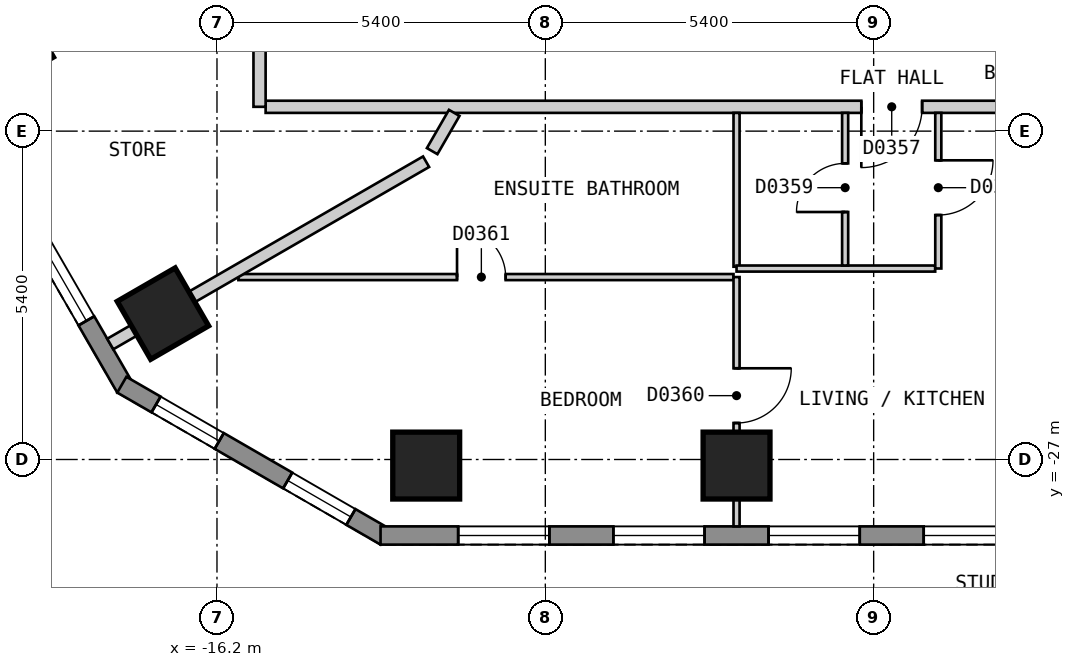
"""IFC4 building model, lengths in metres.
Left out: names, types, materials, properties, quantities, classifications, styles, units other than length and angle.
Written with IfcOpenShell. Run it as: python <this file> out.ifc"""

import sys

from ifc_helpers import new_model, si_unit, direction, frame, frame_2d, origin, origin_2d, place, context, subcontext, project, spatial, polyline, rectangle, outline, extrude, element, fill, save


model = new_model("IFC4")
c1 = context("Model", 3, precision=1e-05, world=origin(), true_north=direction((0.0, 1.0)))
c2 = subcontext(c1, "Body", "Model", "MODEL_VIEW")
j1 = project(units=[si_unit("LENGTHUNIT", "METRE"), si_unit("PLANEANGLEUNIT", "RADIAN")], contexts=[c1])
p1 = place(None, origin())
s1 = spatial("IfcSite", under=j1, at=p1, CompositionType="ELEMENT")
p2 = place(p1, origin())
s2 = spatial("IfcBuilding", under=s1, at=p2, CompositionType="ELEMENT")
p3 = place(p2, frame((0.0, 0.0, 59.4)))
s3 = spatial("IfcBuildingStorey", under=s2, at=p3, CompositionType="ELEMENT", Elevation=59.4)
for number, where, z_axis, x_axis in (
    (1, (-19.641, -20.181, 0.0), (0.0, 0.0, 1.0), (0.5, -0.866, 0.0)),
    (2, (-17.089, -24.601, 0.0), (0.0, 0.0, 1.0), (0.5, -0.866, 0.0)),
    (3, (-12.759, -27.1, 0.0), (0.0, 0.0, 1.0), (1.0, 0.0, 0.0)),
    (4, (-7.655, -27.1, 0.0), (0.0, 0.0, 1.0), (1.0, 0.0, 0.0)),
):
    element("IfcColumn", number, at=place(p3, frame(where, z_axis=z_axis, x_axis=x_axis)), inside=s3, PredefinedType="COLUMN", context=c2, shape_type="SweptSolid", body=[
        extrude(rectangle(XDim=1.1, YDim=1.1, at=origin_2d()), origin(), (0.0, 0.0, 1.0), 3.0),
    ])
p4 = place(p3, frame((-31.22, -2.425, 0.0), z_axis=(0.0, 0.0, 1.0), x_axis=(0.500001938803, -0.866024284413, 0.0)))
e5 = element("IfcWall", 5, at=p4, inside=s3, PredefinedType="SOLIDWALL", context=c2, shape_type="SweptSolid", body=[
    extrude(outline(polyline([(0.0, -0.15), (27.02, -0.15), (26.94, 0.15), (0.08, 0.15), (0.0, -0.15)])), origin(), (0.0, 0.0, 1.0), 2.6),
])
p5 = place(p4, frame((1.277, 0.0, 0.15)))
e6 = element("IfcOpeningElement", 6, at=p5, cuts=e5, PredefinedType="OPENING", context=c2, shape_type="SweptSolid", body=[
    extrude(rectangle(XDim=1.5, YDim=2.1, at=frame_2d((0.75, 1.05))), frame((0.0, 0.16, 0.0), z_axis=(0.0, -1.0, 0.0), x_axis=(1.0, 0.0, 0.0)), (0.0, 0.0, 1.0), 0.32),
])
p6 = place(p4, frame((3.829, 0.0, 0.15)))
e7 = element("IfcOpeningElement", 7, at=p6, cuts=e5, PredefinedType="OPENING", context=c2, shape_type="SweptSolid", body=[
    extrude(rectangle(XDim=1.5, YDim=2.1, at=frame_2d((0.75, 1.05))), frame((0.0, 0.16, 0.0), z_axis=(0.0, -1.0, 0.0), x_axis=(1.0, 0.0, 0.0)), (0.0, 0.0, 1.0), 0.32),
])
p7 = place(p4, frame((6.382, 0.0, 0.15)))
e8 = element("IfcOpeningElement", 8, at=p7, cuts=e5, PredefinedType="OPENING", context=c2, shape_type="SweptSolid", body=[
    extrude(rectangle(XDim=1.5, YDim=2.1, at=frame_2d((0.75, 1.05))), frame((0.0, 0.16, 0.0), z_axis=(0.0, -1.0, 0.0), x_axis=(1.0, 0.0, 0.0)), (0.0, 0.0, 1.0), 0.32),
])
p8 = place(p4, frame((8.933, 0.0, 0.15)))
e9 = element("IfcOpeningElement", 9, at=p8, cuts=e5, PredefinedType="OPENING", context=c2, shape_type="SweptSolid", body=[
    extrude(rectangle(XDim=1.5, YDim=2.1, at=frame_2d((0.75, 1.05))), frame((0.0, 0.16, 0.0), z_axis=(0.0, -1.0, 0.0), x_axis=(1.0, 0.0, 0.0)), (0.0, 0.0, 1.0), 0.32),
])
p9 = place(p4, frame((11.485, 0.0, 0.15)))
e10 = element("IfcOpeningElement", 10, at=p9, cuts=e5, PredefinedType="OPENING", context=c2, shape_type="SweptSolid", body=[
    extrude(rectangle(XDim=1.5, YDim=2.1, at=frame_2d((0.75, 1.05))), frame((0.0, 0.16, 0.0), z_axis=(0.0, -1.0, 0.0), x_axis=(1.0, 0.0, 0.0)), (0.0, 0.0, 1.0), 0.32),
])
p10 = place(p4, frame((14.037, 0.0, 0.15)))
e11 = element("IfcOpeningElement", 11, at=p10, cuts=e5, PredefinedType="OPENING", context=c2, shape_type="SweptSolid", body=[
    extrude(rectangle(XDim=1.5, YDim=2.1, at=frame_2d((0.75, 1.05))), frame((0.0, 0.16, 0.0), z_axis=(0.0, -1.0, 0.0), x_axis=(1.0, 0.0, 0.0)), (0.0, 0.0, 1.0), 0.32),
])
p11 = place(p4, frame((16.589, 0.0, 0.15)))
e12 = element("IfcOpeningElement", 12, at=p11, cuts=e5, PredefinedType="OPENING", context=c2, shape_type="SweptSolid", body=[
    extrude(rectangle(XDim=1.5, YDim=2.1, at=frame_2d((0.75, 1.05))), frame((0.0, 0.16, 0.0), z_axis=(0.0, -1.0, 0.0), x_axis=(1.0, 0.0, 0.0)), (0.0, 0.0, 1.0), 0.32),
])
p12 = place(p4, frame((19.141, 0.0, 0.15)))
e13 = element("IfcOpeningElement", 13, at=p12, cuts=e5, PredefinedType="OPENING", context=c2, shape_type="SweptSolid", body=[
    extrude(rectangle(XDim=1.5, YDim=2.1, at=frame_2d((0.75, 1.05))), frame((0.0, 0.16, 0.0), z_axis=(0.0, -1.0, 0.0), x_axis=(1.0, 0.0, 0.0)), (0.0, 0.0, 1.0), 0.32),
])
p13 = place(p4, frame((21.693, 0.0, 0.15)))
e14 = element("IfcOpeningElement", 14, at=p13, cuts=e5, PredefinedType="OPENING", context=c2, shape_type="SweptSolid", body=[
    extrude(rectangle(XDim=1.5, YDim=2.1, at=frame_2d((0.75, 1.05))), frame((0.0, 0.16, 0.0), z_axis=(0.0, -1.0, 0.0), x_axis=(1.0, 0.0, 0.0)), (0.0, 0.0, 1.0), 0.32),
])
p14 = place(p4, frame((24.244, 0.0, 0.15)))
e15 = element("IfcOpeningElement", 15, at=p14, cuts=e5, PredefinedType="OPENING", context=c2, shape_type="SweptSolid", body=[
    extrude(rectangle(XDim=1.5, YDim=2.1, at=frame_2d((0.75, 1.05))), frame((0.0, 0.16, 0.0), z_axis=(0.0, -1.0, 0.0), x_axis=(1.0, 0.0, 0.0)), (0.0, 0.0, 1.0), 0.32),
])
p15 = place(p3, frame((-17.765, -25.77, 0.0), z_axis=(0.0, 0.0, 1.0), x_axis=(0.866010750942, -0.50002537861, 0.0)))
e16 = element("IfcWall", 16, at=p15, inside=s3, PredefinedType="SOLIDWALL", context=c2, shape_type="SweptSolid", body=[
    extrude(outline(polyline([(0.0, -0.15), (5.0, -0.15), (4.919, 0.15), (0.08, 0.15), (0.0, -0.15)])), origin(), (0.0, 0.0, 1.0), 2.6),
])
p16 = place(p15, frame((0.65, 0.0, 0.15)))
e17 = element("IfcOpeningElement", 17, at=p16, cuts=e16, PredefinedType="OPENING", context=c2, shape_type="SweptSolid", body=[
    extrude(rectangle(XDim=1.2, YDim=2.1, at=frame_2d((0.6, 1.05))), frame((0.0, 0.16, 0.0), z_axis=(0.0, -1.0, 0.0), x_axis=(1.0, 0.0, 0.0)), (0.0, 0.0, 1.0), 0.32),
])
p17 = place(p15, frame((3.15, 0.0, 0.15)))
e18 = element("IfcOpeningElement", 18, at=p17, cuts=e16, PredefinedType="OPENING", context=c2, shape_type="SweptSolid", body=[
    extrude(rectangle(XDim=1.2, YDim=2.1, at=frame_2d((0.6, 1.05))), frame((0.0, 0.16, 0.0), z_axis=(0.0, -1.0, 0.0), x_axis=(1.0, 0.0, 0.0)), (0.0, 0.0, 1.0), 0.32),
])
p18 = place(p3, frame((-13.51, -28.25, 0.0), z_axis=(0.0, 0.0, 1.0), x_axis=(1.0, 0.0, 0.0)))
e19 = element("IfcWall", 19, at=p18, inside=s3, PredefinedType="SOLIDWALL", context=c2, shape_type="SweptSolid", body=[
    extrude(outline(polyline([(0.0, -0.15), (27.02, -0.15), (26.94, 0.15), (0.08, 0.15), (0.0, -0.15)])), origin(), (0.0, 0.0, 1.0), 2.6),
])
p19 = place(p18, frame((1.277, 0.0, 0.15)))
e20 = element("IfcOpeningElement", 20, at=p19, cuts=e19, PredefinedType="OPENING", context=c2, shape_type="SweptSolid", body=[
    extrude(rectangle(XDim=1.5, YDim=2.1, at=frame_2d((0.75, 1.05))), frame((0.0, 0.16, 0.0), z_axis=(0.0, -1.0, 0.0), x_axis=(1.0, 0.0, 0.0)), (0.0, 0.0, 1.0), 0.32),
])
p20 = place(p18, frame((3.829, 0.0, 0.15)))
e21 = element("IfcOpeningElement", 21, at=p20, cuts=e19, PredefinedType="OPENING", context=c2, shape_type="SweptSolid", body=[
    extrude(rectangle(XDim=1.5, YDim=2.1, at=frame_2d((0.75, 1.05))), frame((0.0, 0.16, 0.0), z_axis=(0.0, -1.0, 0.0), x_axis=(1.0, 0.0, 0.0)), (0.0, 0.0, 1.0), 0.32),
])
p21 = place(p18, frame((6.381, 0.0, 0.15)))
e22 = element("IfcOpeningElement", 22, at=p21, cuts=e19, PredefinedType="OPENING", context=c2, shape_type="SweptSolid", body=[
    extrude(rectangle(XDim=1.5, YDim=2.1, at=frame_2d((0.75, 1.05))), frame((0.0, 0.16, 0.0), z_axis=(0.0, -1.0, 0.0), x_axis=(1.0, 0.0, 0.0)), (0.0, 0.0, 1.0), 0.32),
])
p22 = place(p18, frame((8.933, 0.0, 0.15)))
e23 = element("IfcOpeningElement", 23, at=p22, cuts=e19, PredefinedType="OPENING", context=c2, shape_type="SweptSolid", body=[
    extrude(rectangle(XDim=1.5, YDim=2.1, at=frame_2d((0.75, 1.05))), frame((0.0, 0.16, 0.0), z_axis=(0.0, -1.0, 0.0), x_axis=(1.0, 0.0, 0.0)), (0.0, 0.0, 1.0), 0.32),
])
p23 = place(p18, frame((11.485, 0.0, 0.15)))
e24 = element("IfcOpeningElement", 24, at=p23, cuts=e19, PredefinedType="OPENING", context=c2, shape_type="SweptSolid", body=[
    extrude(rectangle(XDim=1.5, YDim=2.1, at=frame_2d((0.75, 1.05))), frame((0.0, 0.16, 0.0), z_axis=(0.0, -1.0, 0.0), x_axis=(1.0, 0.0, 0.0)), (0.0, 0.0, 1.0), 0.32),
])
p24 = place(p18, frame((14.037, 0.0, 0.15)))
e25 = element("IfcOpeningElement", 25, at=p24, cuts=e19, PredefinedType="OPENING", context=c2, shape_type="SweptSolid", body=[
    extrude(rectangle(XDim=1.5, YDim=2.1, at=frame_2d((0.75, 1.05))), frame((0.0, 0.16, 0.0), z_axis=(0.0, -1.0, 0.0), x_axis=(1.0, 0.0, 0.0)), (0.0, 0.0, 1.0), 0.32),
])
p25 = place(p18, frame((16.589, 0.0, 0.15)))
e26 = element("IfcOpeningElement", 26, at=p25, cuts=e19, PredefinedType="OPENING", context=c2, shape_type="SweptSolid", body=[
    extrude(rectangle(XDim=1.5, YDim=2.1, at=frame_2d((0.75, 1.05))), frame((0.0, 0.16, 0.0), z_axis=(0.0, -1.0, 0.0), x_axis=(1.0, 0.0, 0.0)), (0.0, 0.0, 1.0), 0.32),
])
p26 = place(p18, frame((19.141, 0.0, 0.15)))
e27 = element("IfcOpeningElement", 27, at=p26, cuts=e19, PredefinedType="OPENING", context=c2, shape_type="SweptSolid", body=[
    extrude(rectangle(XDim=1.5, YDim=2.1, at=frame_2d((0.75, 1.05))), frame((0.0, 0.16, 0.0), z_axis=(0.0, -1.0, 0.0), x_axis=(1.0, 0.0, 0.0)), (0.0, 0.0, 1.0), 0.32),
])
p27 = place(p18, frame((21.693, 0.0, 0.15)))
e28 = element("IfcOpeningElement", 28, at=p27, cuts=e19, PredefinedType="OPENING", context=c2, shape_type="SweptSolid", body=[
    extrude(rectangle(XDim=1.5, YDim=2.1, at=frame_2d((0.75, 1.05))), frame((0.0, 0.16, 0.0), z_axis=(0.0, -1.0, 0.0), x_axis=(1.0, 0.0, 0.0)), (0.0, 0.0, 1.0), 0.32),
])
p28 = place(p18, frame((24.245, 0.0, 0.15)))
e29 = element("IfcOpeningElement", 29, at=p28, cuts=e19, PredefinedType="OPENING", context=c2, shape_type="SweptSolid", body=[
    extrude(rectangle(XDim=1.5, YDim=2.1, at=frame_2d((0.75, 1.05))), frame((0.0, 0.16, 0.0), z_axis=(0.0, -1.0, 0.0), x_axis=(1.0, 0.0, 0.0)), (0.0, 0.0, 1.0), 0.32),
])
p29 = place(p3, frame((-15.4, -21.2, 0.0), z_axis=(0.0, 0.0, 1.0), x_axis=(1.0, 0.0, 0.0)))
e30 = element("IfcWall", 30, at=p29, inside=s3, PredefinedType="PARTITIONING", context=c2, shape_type="SweptSolid", body=[
    extrude(rectangle(XDim=30.799, YDim=0.2, at=frame_2d((15.399, 0.0))), origin(), (0.0, 0.0, 1.0), 2.6),
])
p30 = place(p29, frame((9.797, 0.0, 0.0)))
e31 = element("IfcOpeningElement", 31, at=p30, cuts=e30, PredefinedType="OPENING", context=c2, shape_type="SweptSolid", body=[
    extrude(rectangle(XDim=1.0, YDim=2.1, at=frame_2d((0.5, 1.05))), frame((0.0, 0.11, 0.0), z_axis=(0.0, -1.0, 0.0), x_axis=(1.0, 0.0, 0.0)), (0.0, 0.0, 1.0), 0.22),
])
p31 = place(p29, frame((14.901, 0.0, 0.0)))
e32 = element("IfcOpeningElement", 32, at=p31, cuts=e30, PredefinedType="OPENING", context=c2, shape_type="SweptSolid", body=[
    extrude(rectangle(XDim=1.0, YDim=2.1, at=frame_2d((0.5, 1.05))), frame((0.0, 0.11, 0.0), z_axis=(0.0, -1.0, 0.0), x_axis=(1.0, 0.0, 0.0)), (0.0, 0.0, 1.0), 0.22),
])
p32 = place(p29, frame((24.916, 0.0, 0.0)))
e33 = element("IfcOpeningElement", 33, at=p32, cuts=e30, PredefinedType="OPENING", context=c2, shape_type="SweptSolid", body=[
    extrude(rectangle(XDim=0.9, YDim=2.1, at=frame_2d((0.45, 1.05))), frame((0.0, 0.11, 0.0), z_axis=(0.0, -1.0, 0.0), x_axis=(1.0, 0.0, 0.0)), (0.0, 0.0, 1.0), 0.22),
])
p33 = place(p3, frame((-15.5, -21.2, 0.0), z_axis=(0.0, 0.0, 1.0), x_axis=(0.0, 1.0, 0.0)))
e34 = element("IfcWall", 34, at=p33, inside=s3, PredefinedType="PARTITIONING", context=c2, shape_type="SweptSolid", body=[
    extrude(rectangle(XDim=4.8, YDim=0.2, at=frame_2d((2.4, 0.0))), origin(), (0.0, 0.0, 1.0), 2.6),
])
p34 = place(p33, frame((1.258, 0.0, 0.0)))
e35 = element("IfcOpeningElement", 35, at=p34, cuts=e34, PredefinedType="OPENING", context=c2, shape_type="SweptSolid", body=[
    extrude(rectangle(XDim=0.8, YDim=2.1, at=frame_2d((0.4, 1.05))), frame((0.0, 0.11, 0.0), z_axis=(0.0, -1.0, 0.0), x_axis=(1.0, 0.0, 0.0)), (0.0, 0.0, 1.0), 0.22),
])
p35 = place(p3, frame((-7.655, -21.3, 0.0), z_axis=(0.0, 0.0, 1.0), x_axis=(0.0, -1.0, 0.0)))
e36 = element("IfcWall", 36, at=p35, inside=s3, PredefinedType="PARTITIONING", context=c2, shape_type="SweptSolid", body=[
    extrude(rectangle(XDim=2.53, YDim=0.1, at=frame_2d((1.265, 0.0))), origin(), (0.0, 0.0, 1.0), 2.6),
])
p36 = place(p3, frame((-7.655, -23.86, 0.0), z_axis=(0.0, 0.0, 1.0), x_axis=(1.0, 0.0, 0.0)))
e37 = element("IfcWall", 37, at=p36, inside=s3, PredefinedType="PARTITIONING", context=c2, shape_type="SweptSolid", body=[
    extrude(rectangle(XDim=3.267, YDim=0.1, at=frame_2d((1.634, 0.0))), origin(), (0.0, 0.0, 1.0), 2.6),
])
p37 = place(p3, frame((-15.848, -24.0, 0.0), z_axis=(0.0, 0.0, 1.0), x_axis=(1.0, 0.0, 0.0)))
e38 = element("IfcWall", 38, at=p37, inside=s3, PredefinedType="PARTITIONING", context=c2, shape_type="SweptSolid", body=[
    extrude(rectangle(XDim=8.143, YDim=0.1, at=frame_2d((4.071, 0.0))), origin(), (0.0, 0.0, 1.0), 2.6),
])
p38 = place(p37, frame((3.596, 0.0, 0.0)))
e39 = element("IfcOpeningElement", 39, at=p38, cuts=e38, PredefinedType="OPENING", context=c2, shape_type="SweptSolid", body=[
    extrude(rectangle(XDim=0.8, YDim=2.1, at=frame_2d((0.4, 1.05))), frame((0.0, 0.06, 0.0), z_axis=(0.0, -1.0, 0.0), x_axis=(1.0, 0.0, 0.0)), (0.0, 0.0, 1.0), 0.12),
])
p39 = place(p3, frame((-4.337, -23.859, 0.0), z_axis=(0.0, 0.0, 1.0), x_axis=(0.0, 1.0, 0.0)))
e40 = element("IfcWall", 40, at=p39, inside=s3, PredefinedType="PARTITIONING", context=c2, shape_type="SweptSolid", body=[
    extrude(rectangle(XDim=2.559, YDim=0.1, at=frame_2d((1.279, 0.0))), origin(), (0.0, 0.0, 1.0), 2.6),
])
p40 = place(p39, frame((0.879, 0.0, 0.0)))
e41 = element("IfcOpeningElement", 41, at=p40, cuts=e40, PredefinedType="OPENING", context=c2, shape_type="SweptSolid", body=[
    extrude(rectangle(XDim=0.9, YDim=2.1, at=frame_2d((0.45, 1.05))), frame((0.0, 0.06, 0.0), z_axis=(0.0, -1.0, 0.0), x_axis=(1.0, 0.0, 0.0)), (0.0, 0.0, 1.0), 0.12),
])
p41 = place(p3, frame((-5.869, -23.81, 0.0), z_axis=(0.0, 0.0, 1.0), x_axis=(0.0, 1.0, 0.0)))
e42 = element("IfcWall", 42, at=p41, inside=s3, PredefinedType="PARTITIONING", context=c2, shape_type="SweptSolid", body=[
    extrude(rectangle(XDim=2.51, YDim=0.1, at=frame_2d((1.255, 0.0))), origin(), (0.0, 0.0, 1.0), 2.6),
])
p42 = place(p41, frame((0.88, 0.0, 0.0)))
e43 = element("IfcOpeningElement", 43, at=p42, cuts=e42, PredefinedType="OPENING", context=c2, shape_type="SweptSolid", body=[
    extrude(rectangle(XDim=0.8, YDim=2.1, at=frame_2d((0.4, 1.05))), frame((0.0, 0.06, 0.0), z_axis=(0.0, -1.0, 0.0), x_axis=(1.0, 0.0, 0.0)), (0.0, 0.0, 1.0), 0.12),
])
p43 = place(p3, frame((-7.655, -28.1, 0.0), z_axis=(0.0, 0.0, 1.0), x_axis=(0.0, 1.0, 0.0)))
e44 = element("IfcWall", 44, at=p43, inside=s3, PredefinedType="PARTITIONING", context=c2, shape_type="SweptSolid", body=[
    extrude(rectangle(XDim=4.1, YDim=0.1, at=frame_2d((2.05, 0.0))), origin(), (0.0, 0.0, 1.0), 2.6),
])
p44 = place(p43, frame((1.7, 0.0, 0.0)))
e45 = element("IfcOpeningElement", 45, at=p44, cuts=e44, PredefinedType="OPENING", context=c2, shape_type="SweptSolid", body=[
    extrude(rectangle(XDim=0.9, YDim=2.1, at=frame_2d((0.45, 1.05))), frame((0.0, 0.06, 0.0), z_axis=(0.0, -1.0, 0.0), x_axis=(1.0, 0.0, 0.0)), (0.0, 0.0, 1.0), 0.12),
])
p45 = place(p3, frame((-12.661, -21.929, 0.0), z_axis=(0.0, 0.0, 1.0), x_axis=(0.499683639304, 0.866207977689, 0.0)))
e46 = element("IfcWall", 46, at=p45, inside=s3, PredefinedType="PARTITIONING", context=c2, shape_type="SweptSolid", body=[
    extrude(rectangle(XDim=0.726, YDim=0.2, at=frame_2d((0.363, 0.0))), origin(), (0.0, 0.0, 1.0), 2.6),
])
p46 = place(p3, frame((-20.507, -20.681, 0.0), z_axis=(0.0, 0.0, 1.0), x_axis=(0.866028446103, 0.499994730513, 0.0)))
e47 = element("IfcWall", 47, at=p46, inside=s3, PredefinedType="PARTITIONING", context=c2, shape_type="SweptSolid", body=[
    extrude(rectangle(XDim=5.666, YDim=0.2, at=frame_2d((2.833, 0.0))), origin(), (0.0, 0.0, 1.0), 2.6),
])
p47 = place(p3, frame((-17.955, -25.101, 0.0), z_axis=(0.0, 0.0, 1.0), x_axis=(0.866080519133, 0.499904525262, 0.0)))
e48 = element("IfcWall", 48, at=p47, inside=s3, PredefinedType="PARTITIONING", context=c2, shape_type="SweptSolid", body=[
    extrude(rectangle(XDim=5.997, YDim=0.2, at=frame_2d((2.999, 0.0))), origin(), (0.0, 0.0, 1.0), 2.6),
])
p48 = place(p14, origin())
e49 = element("IfcWindow", 49, at=p48, inside=s3, PartitioningType="SINGLE_PANEL", PredefinedType="WINDOW", context=c2, shape_type="SweptSolid", body=[
    extrude(rectangle(XDim=1.5, YDim=2.1, at=frame_2d((0.75, 1.05))), frame((0.0, 0.03, 0.0), z_axis=(0.0, -1.0, 0.0), x_axis=(1.0, 0.0, 0.0)), (0.0, 0.0, 1.0), 0.06),
])
fill(e15, e49)
p49 = place(p16, origin())
e50 = element("IfcWindow", 50, at=p49, inside=s3, PartitioningType="SINGLE_PANEL", PredefinedType="WINDOW", context=c2, shape_type="SweptSolid", body=[
    extrude(rectangle(XDim=1.2, YDim=2.1, at=frame_2d((0.6, 1.05))), frame((0.0, 0.03, 0.0), z_axis=(0.0, -1.0, 0.0), x_axis=(1.0, 0.0, 0.0)), (0.0, 0.0, 1.0), 0.06),
])
fill(e17, e50)
p50 = place(p17, origin())
e51 = element("IfcWindow", 51, at=p50, inside=s3, PartitioningType="SINGLE_PANEL", PredefinedType="WINDOW", context=c2, shape_type="SweptSolid", body=[
    extrude(rectangle(XDim=1.2, YDim=2.1, at=frame_2d((0.6, 1.05))), frame((0.0, 0.03, 0.0), z_axis=(0.0, -1.0, 0.0), x_axis=(1.0, 0.0, 0.0)), (0.0, 0.0, 1.0), 0.06),
])
fill(e18, e51)
p51 = place(p19, origin())
e52 = element("IfcWindow", 52, at=p51, inside=s3, PartitioningType="SINGLE_PANEL", PredefinedType="WINDOW", context=c2, shape_type="SweptSolid", body=[
    extrude(rectangle(XDim=1.5, YDim=2.1, at=frame_2d((0.75, 1.05))), frame((0.0, 0.03, 0.0), z_axis=(0.0, -1.0, 0.0), x_axis=(1.0, 0.0, 0.0)), (0.0, 0.0, 1.0), 0.06),
])
fill(e20, e52)
p52 = place(p20, origin())
e53 = element("IfcWindow", 53, at=p52, inside=s3, PartitioningType="SINGLE_PANEL", PredefinedType="WINDOW", context=c2, shape_type="SweptSolid", body=[
    extrude(rectangle(XDim=1.5, YDim=2.1, at=frame_2d((0.75, 1.05))), frame((0.0, 0.03, 0.0), z_axis=(0.0, -1.0, 0.0), x_axis=(1.0, 0.0, 0.0)), (0.0, 0.0, 1.0), 0.06),
])
fill(e21, e53)
p53 = place(p21, origin())
e54 = element("IfcWindow", 54, at=p53, inside=s3, PartitioningType="SINGLE_PANEL", PredefinedType="WINDOW", context=c2, shape_type="SweptSolid", body=[
    extrude(rectangle(XDim=1.5, YDim=2.1, at=frame_2d((0.75, 1.05))), frame((0.0, 0.03, 0.0), z_axis=(0.0, -1.0, 0.0), x_axis=(1.0, 0.0, 0.0)), (0.0, 0.0, 1.0), 0.06),
])
fill(e22, e54)
p54 = place(p22, origin())
e55 = element("IfcWindow", 55, at=p54, inside=s3, PartitioningType="SINGLE_PANEL", PredefinedType="WINDOW", context=c2, shape_type="SweptSolid", body=[
    extrude(rectangle(XDim=1.5, YDim=2.1, at=frame_2d((0.75, 1.05))), frame((0.0, 0.03, 0.0), z_axis=(0.0, -1.0, 0.0), x_axis=(1.0, 0.0, 0.0)), (0.0, 0.0, 1.0), 0.06),
])
fill(e23, e55)
p55 = place(p30, origin())
e56 = element("IfcDoor", 56, at=p55, inside=s3, OperationType="SINGLE_SWING_LEFT", PredefinedType="DOOR", context=c2, shape_type="SweptSolid", body=[
    extrude(rectangle(XDim=1.0, YDim=2.1, at=frame_2d((0.5, 1.05))), frame((0.0, 0.025, 0.0), z_axis=(0.0, -1.0, 0.0), x_axis=(1.0, 0.0, 0.0)), (0.0, 0.0, 1.0), 0.05),
])
fill(e31, e56)
p56 = place(p40, origin())
e57 = element("IfcDoor", 57, at=p56, inside=s3, OperationType="SINGLE_SWING_RIGHT", PredefinedType="DOOR", context=c2, shape_type="SweptSolid", body=[
    extrude(rectangle(XDim=0.9, YDim=2.1, at=frame_2d((0.45, 1.05))), frame((0.0, 0.025, 0.0), z_axis=(0.0, -1.0, 0.0), x_axis=(1.0, 0.0, 0.0)), (0.0, 0.0, 1.0), 0.05),
])
fill(e41, e57)
p57 = place(p42, origin())
e58 = element("IfcDoor", 58, at=p57, inside=s3, OperationType="SINGLE_SWING_LEFT", PredefinedType="DOOR", context=c2, shape_type="SweptSolid", body=[
    extrude(rectangle(XDim=0.8, YDim=2.1, at=frame_2d((0.4, 1.05))), frame((0.0, 0.025, 0.0), z_axis=(0.0, -1.0, 0.0), x_axis=(1.0, 0.0, 0.0)), (0.0, 0.0, 1.0), 0.05),
])
fill(e43, e58)
p58 = place(p44, origin())
e59 = element("IfcDoor", 59, at=p58, inside=s3, OperationType="SINGLE_SWING_RIGHT", PredefinedType="DOOR", context=c2, shape_type="SweptSolid", body=[
    extrude(rectangle(XDim=0.9, YDim=2.1, at=frame_2d((0.45, 1.05))), frame((0.0, 0.025, 0.0), z_axis=(0.0, -1.0, 0.0), x_axis=(1.0, 0.0, 0.0)), (0.0, 0.0, 1.0), 0.05),
])
fill(e45, e59)
p59 = place(p38, origin())
e60 = element("IfcDoor", 60, at=p59, inside=s3, OperationType="SINGLE_SWING_LEFT", PredefinedType="DOOR", context=c2, shape_type="SweptSolid", body=[
    extrude(rectangle(XDim=0.8, YDim=2.1, at=frame_2d((0.4, 1.05))), frame((0.0, 0.025, 0.0), z_axis=(0.0, -1.0, 0.0), x_axis=(1.0, 0.0, 0.0)), (0.0, 0.0, 1.0), 0.05),
])
fill(e39, e60)
save(model, sys.argv[1])
